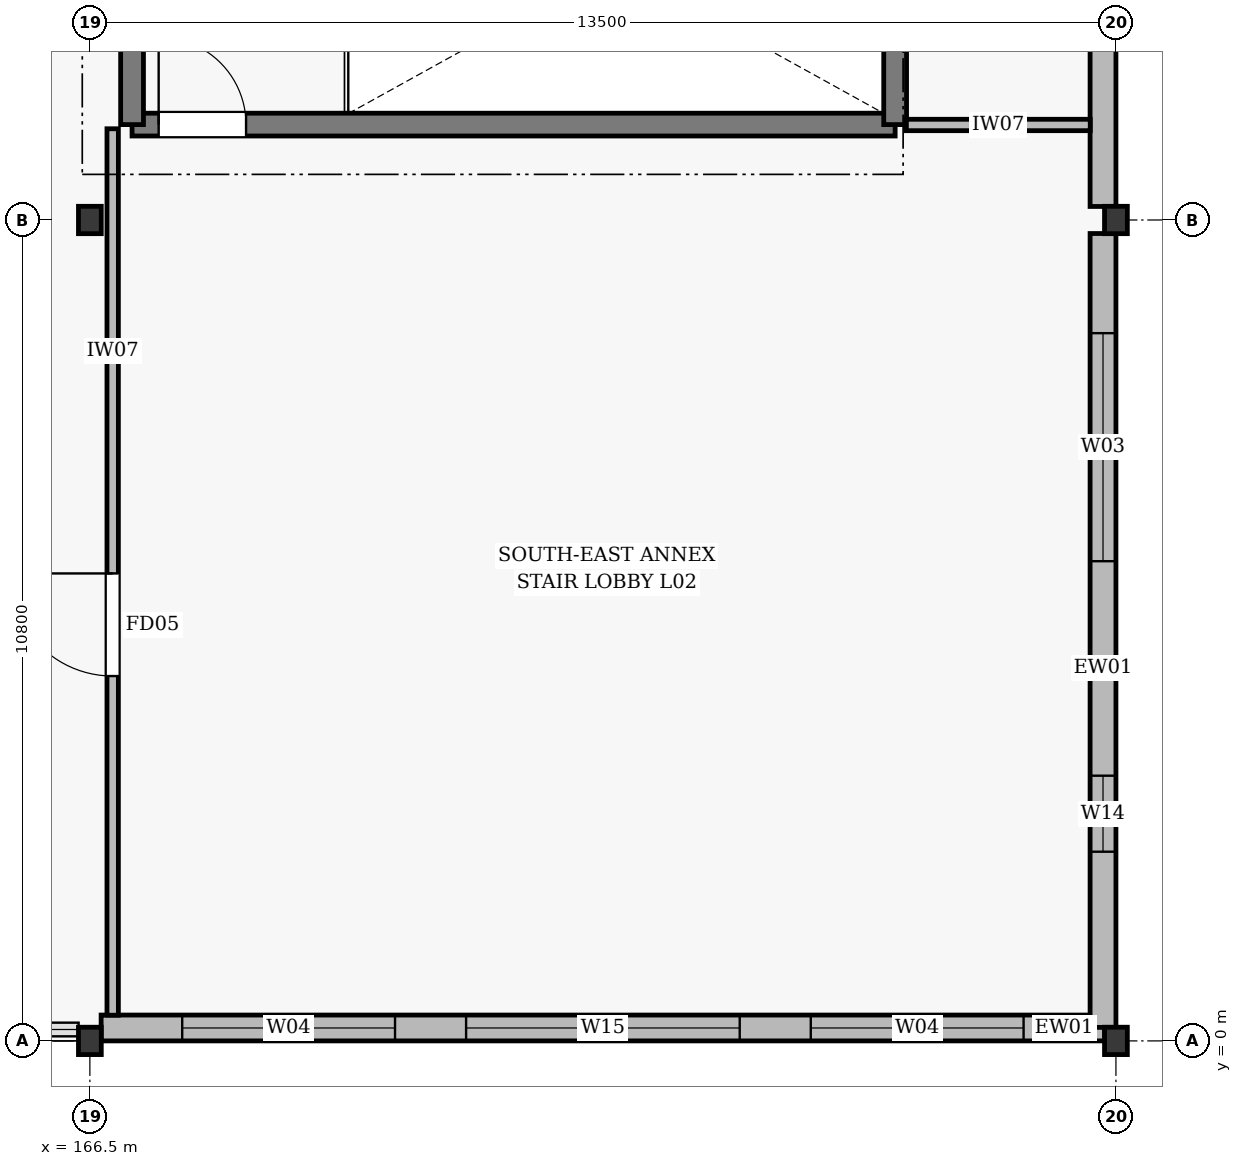
"""IFC4 building model, lengths in metres.
Left out: names, types, materials, properties, quantities, classifications, styles, units other than length and angle.
Written with IfcOpenShell. Run it as: python <this file> out.ifc"""

import sys

from ifc_helpers import new_model, si_unit, direction, frame, frame_2d, origin, origin_2d, place, context, subcontext, project, spatial, rectangle, i_section, extrude, element, fill, save


model = new_model("IFC4")
c1 = context("Model", 3, precision=1e-05, world=origin(), true_north=direction((0.0, 1.0)))
c2 = subcontext(c1, "Body", "Model", "MODEL_VIEW")
j1 = project(units=[si_unit("LENGTHUNIT", "METRE"), si_unit("PLANEANGLEUNIT", "RADIAN")], contexts=[c1])
p1 = place(None, origin())
s1 = spatial("IfcSite", under=j1, at=p1, CompositionType="ELEMENT")
p2 = place(p1, origin())
s2 = spatial("IfcBuilding", under=s1, at=p2, CompositionType="ELEMENT")
p3 = place(p2, frame((0.0, 0.0, 12.6)))
s3 = spatial("IfcBuildingStorey", under=s2, at=p3, CompositionType="ELEMENT", Elevation=12.6)
for number, where, z_axis, x_axis in (
    (1, (166.5, 0.0, 0.0), (0.0, 0.0, 1.0), (1.0, 0.0, 0.0)),
    (2, (166.5, 10.8, 0.0), (0.0, 0.0, 1.0), (1.0, 0.0, 0.0)),
    (3, (180.0, 0.0, 0.0), (0.0, 0.0, 1.0), (1.0, 0.0, 0.0)),
    (4, (180.0, 10.8, 0.0), (0.0, 0.0, 1.0), (1.0, 0.0, 0.0)),
):
    element("IfcColumn", number, at=place(p3, frame(where, z_axis=z_axis, x_axis=x_axis)), inside=s3, PredefinedType="COLUMN", context=c2, shape_type="SweptSolid", body=[
        extrude(i_section(OverallWidth=0.3, OverallDepth=0.36, WebThickness=0.012, FlangeThickness=0.022, at=origin_2d()), origin(), (0.0, 0.0, 1.0), 4.8),
    ])
p4 = place(p3, frame((166.648, 0.17, 0.0), z_axis=(0.0, 0.0, 1.0), x_axis=(1.0, 0.0, 0.0)))
e5 = element("IfcWall", 5, at=p4, inside=s3, PredefinedType="STANDARD", context=c2, shape_type="SweptSolid", body=[
    extrude(rectangle(XDim=13.204, YDim=0.34, at=frame_2d((6.602, 0.0))), origin(), (0.0, 0.0, 1.0), 3.9),
])
p5 = place(p4, frame((1.067, 0.0, 0.75)))
e6 = element("IfcOpeningElement", 6, at=p5, cuts=e5, PredefinedType="OPENING", context=c2, shape_type="SweptSolid", body=[
    extrude(rectangle(XDim=2.8, YDim=2.6, at=frame_2d((1.4, 1.3))), frame((0.0, 0.182, 0.0), z_axis=(0.0, -1.0, 0.0), x_axis=(1.0, 0.0, 0.0)), (0.0, 0.0, 1.0), 0.364),
])
p6 = place(p4, frame((4.802, 0.0, 1.05)))
e7 = element("IfcOpeningElement", 7, at=p6, cuts=e5, PredefinedType="OPENING", context=c2, shape_type="SweptSolid", body=[
    extrude(rectangle(XDim=3.6, YDim=1.4, at=frame_2d((1.8, 0.7))), frame((0.0, 0.182, 0.0), z_axis=(0.0, -1.0, 0.0), x_axis=(1.0, 0.0, 0.0)), (0.0, 0.0, 1.0), 0.364),
])
p7 = place(p4, frame((9.337, 0.0, 0.75)))
e8 = element("IfcOpeningElement", 8, at=p7, cuts=e5, PredefinedType="OPENING", context=c2, shape_type="SweptSolid", body=[
    extrude(rectangle(XDim=2.8, YDim=2.6, at=frame_2d((1.4, 1.3))), frame((0.0, 0.182, 0.0), z_axis=(0.0, -1.0, 0.0), x_axis=(1.0, 0.0, 0.0)), (0.0, 0.0, 1.0), 0.364),
])
p8 = place(p3, frame((179.83, 10.622, 0.0), z_axis=(0.0, 0.0, 1.0), x_axis=(0.0, -1.0, 0.0)))
e9 = element("IfcWall", 9, at=p8, inside=s3, PredefinedType="STANDARD", context=c2, shape_type="SweptSolid", body=[
    extrude(rectangle(XDim=10.444, YDim=0.34, at=frame_2d((5.222, 0.0))), origin(), (0.0, 0.0, 1.0), 3.9),
])
p9 = place(p8, frame((1.311, 0.0, 0.75)))
e10 = element("IfcOpeningElement", 10, at=p9, cuts=e9, PredefinedType="OPENING", context=c2, shape_type="SweptSolid", body=[
    extrude(rectangle(XDim=3.0, YDim=2.6, at=frame_2d((1.5, 1.3))), frame((0.0, 0.182, 0.0), z_axis=(0.0, -1.0, 0.0), x_axis=(1.0, 0.0, 0.0)), (0.0, 0.0, 1.0), 0.364),
])
p10 = place(p8, frame((7.133, 0.0, 1.05)))
e11 = element("IfcOpeningElement", 11, at=p10, cuts=e9, PredefinedType="OPENING", context=c2, shape_type="SweptSolid", body=[
    extrude(rectangle(XDim=1.0, YDim=1.6, at=frame_2d((0.5, 0.8))), frame((0.0, 0.182, 0.0), z_axis=(0.0, -1.0, 0.0), x_axis=(1.0, 0.0, 0.0)), (0.0, 0.0, 1.0), 0.364),
])
p11 = place(p3, frame((179.83, 21.422, 0.0), z_axis=(0.0, 0.0, 1.0), x_axis=(0.0, -1.0, 0.0)))
e12 = element("IfcWall", 12, at=p11, inside=s3, PredefinedType="STANDARD", context=c2, shape_type="SweptSolid", body=[
    extrude(rectangle(XDim=10.444, YDim=0.34, at=frame_2d((5.222, 0.0))), origin(), (0.0, 0.0, 1.0), 3.9),
])
p12 = place(p11, frame((1.311, 0.0, 0.75)))
e13 = element("IfcOpeningElement", 13, at=p12, cuts=e12, PredefinedType="OPENING", context=c2, shape_type="SweptSolid", body=[
    extrude(rectangle(XDim=3.0, YDim=2.6, at=frame_2d((1.5, 1.3))), frame((0.0, 0.182, 0.0), z_axis=(0.0, -1.0, 0.0), x_axis=(1.0, 0.0, 0.0)), (0.0, 0.0, 1.0), 0.364),
])
p13 = place(p11, frame((7.133, 0.0, 1.05)))
e14 = element("IfcOpeningElement", 14, at=p13, cuts=e12, PredefinedType="OPENING", context=c2, shape_type="SweptSolid", body=[
    extrude(rectangle(XDim=1.0, YDim=1.6, at=frame_2d((0.5, 0.8))), frame((0.0, 0.182, 0.0), z_axis=(0.0, -1.0, 0.0), x_axis=(1.0, 0.0, 0.0)), (0.0, 0.0, 1.0), 0.364),
])
p14 = place(p3, frame((167.055, 12.055, 0.0), z_axis=(0.0, 0.0, 1.0), x_axis=(1.0, 0.0, 0.0)))
e15 = element("IfcWall", 15, at=p14, inside=s3, PredefinedType="SOLIDWALL", context=c2, shape_type="SweptSolid", body=[
    extrude(rectangle(XDim=10.04, YDim=0.3, at=frame_2d((5.02, 0.0))), origin(), (0.0, 0.0, 1.0), 4.5),
])
p15 = place(p14, frame((0.35, 0.0, 0.005)))
e16 = element("IfcOpeningElement", 16, at=p15, cuts=e15, PredefinedType="OPENING", context=c2, shape_type="SweptSolid", body=[
    extrude(rectangle(XDim=1.15, YDim=2.15, at=frame_2d((0.575, 1.075))), frame((0.0, 0.162, 0.0), z_axis=(0.0, -1.0, 0.0), x_axis=(1.0, 0.0, 0.0)), (0.0, 0.0, 1.0), 0.324),
])
for number, where, z_axis, x_axis in (
    (17, (167.055, 12.055, 0.0), (0.0, 0.0, 1.0), (0.0, 1.0, 0.0)),
    (18, (177.095, 12.055, 0.0), (0.0, 0.0, 1.0), (0.0, 1.0, 0.0)),
):
    element("IfcWall", number, at=place(p3, frame(where, z_axis=z_axis, x_axis=x_axis)), inside=s3, PredefinedType="SOLIDWALL", context=c2, shape_type="SweptSolid", body=[
        extrude(rectangle(XDim=4.19, YDim=0.3, at=frame_2d((2.095, 0.0))), origin(), (0.0, 0.0, 1.0), 4.5),
    ])
p16 = place(p3, frame((166.8, 0.338, 0.0), z_axis=(0.0, 0.0, 1.0), x_axis=(0.0, 1.0, 0.0)))
e19 = element("IfcWall", 19, at=p16, inside=s3, PredefinedType="PARTITIONING", context=c2, shape_type="SweptSolid", body=[
    extrude(rectangle(XDim=11.662, YDim=0.15, at=frame_2d((5.831, 0.0))), origin(), (0.0, 0.0, 1.0), 4.08),
])
p17 = place(p16, frame((4.462, 0.0, 0.005)))
e20 = element("IfcOpeningElement", 20, at=p17, cuts=e19, PredefinedType="OPENING", context=c2, shape_type="SweptSolid", body=[
    extrude(rectangle(XDim=1.35, YDim=2.15, at=frame_2d((0.675, 1.075))), frame((0.0, 0.087, 0.0), z_axis=(0.0, -1.0, 0.0), x_axis=(1.0, 0.0, 0.0)), (0.0, 0.0, 1.0), 0.174),
])
p18 = place(p3, frame((177.243, 12.05, 0.0), z_axis=(0.0, 0.0, 1.0), x_axis=(1.0, 0.0, 0.0)))
e21 = element("IfcWall", 21, at=p18, inside=s3, PredefinedType="PARTITIONING", context=c2, shape_type="SweptSolid", body=[
    extrude(rectangle(XDim=2.419, YDim=0.15, at=frame_2d((1.209, 0.0))), origin(), (0.0, 0.0, 1.0), 4.27),
])
p19 = place(p5, origin())
e22 = element("IfcWindow", 22, at=p19, inside=s3, PartitioningType="DOUBLE_PANEL_VERTICAL", PredefinedType="WINDOW", context=c2, shape_type="SweptSolid", body=[
    extrude(rectangle(XDim=2.8, YDim=2.6, at=frame_2d((1.4, 1.3))), frame((0.0, 0.03, 0.0), z_axis=(0.0, -1.0, 0.0), x_axis=(1.0, 0.0, 0.0)), (0.0, 0.0, 1.0), 0.06),
])
fill(e6, e22)
p20 = place(p6, origin())
e23 = element("IfcWindow", 23, at=p20, inside=s3, PartitioningType="DOUBLE_PANEL_VERTICAL", PredefinedType="WINDOW", context=c2, shape_type="SweptSolid", body=[
    extrude(rectangle(XDim=3.6, YDim=1.4, at=frame_2d((1.8, 0.7))), frame((0.0, 0.03, 0.0), z_axis=(0.0, -1.0, 0.0), x_axis=(1.0, 0.0, 0.0)), (0.0, 0.0, 1.0), 0.06),
])
fill(e7, e23)
p21 = place(p7, origin())
e24 = element("IfcWindow", 24, at=p21, inside=s3, PartitioningType="DOUBLE_PANEL_VERTICAL", PredefinedType="WINDOW", context=c2, shape_type="SweptSolid", body=[
    extrude(rectangle(XDim=2.8, YDim=2.6, at=frame_2d((1.4, 1.3))), frame((0.0, 0.03, 0.0), z_axis=(0.0, -1.0, 0.0), x_axis=(1.0, 0.0, 0.0)), (0.0, 0.0, 1.0), 0.06),
])
fill(e8, e24)
p22 = place(p9, origin())
e25 = element("IfcWindow", 25, at=p22, inside=s3, PartitioningType="DOUBLE_PANEL_VERTICAL", PredefinedType="WINDOW", context=c2, shape_type="SweptSolid", body=[
    extrude(rectangle(XDim=3.0, YDim=2.6, at=frame_2d((1.5, 1.3))), frame((0.0, 0.03, 0.0), z_axis=(0.0, -1.0, 0.0), x_axis=(1.0, 0.0, 0.0)), (0.0, 0.0, 1.0), 0.06),
])
fill(e10, e25)
p23 = place(p10, origin())
e26 = element("IfcWindow", 26, at=p23, inside=s3, PartitioningType="DOUBLE_PANEL_VERTICAL", PredefinedType="WINDOW", context=c2, shape_type="SweptSolid", body=[
    extrude(rectangle(XDim=1.0, YDim=1.6, at=frame_2d((0.5, 0.8))), frame((0.0, 0.03, 0.0), z_axis=(0.0, -1.0, 0.0), x_axis=(1.0, 0.0, 0.0)), (0.0, 0.0, 1.0), 0.06),
])
fill(e11, e26)
p24 = place(p15, origin())
e27 = element("IfcDoor", 27, at=p24, inside=s3, OperationType="SINGLE_SWING_LEFT", PredefinedType="DOOR", context=c2, shape_type="SweptSolid", body=[
    extrude(rectangle(XDim=1.15, YDim=2.15, at=frame_2d((0.575, 1.075))), frame((0.0, 0.025, 0.0), z_axis=(0.0, -1.0, 0.0), x_axis=(1.0, 0.0, 0.0)), (0.0, 0.0, 1.0), 0.05),
])
fill(e16, e27)
p25 = place(p17, origin())
e28 = element("IfcDoor", 28, at=p25, inside=s3, OperationType="SINGLE_SWING_RIGHT", PredefinedType="DOOR", context=c2, shape_type="SweptSolid", body=[
    extrude(rectangle(XDim=1.35, YDim=2.15, at=frame_2d((0.675, 1.075))), frame((0.0, 0.025, 0.0), z_axis=(0.0, -1.0, 0.0), x_axis=(1.0, 0.0, 0.0)), (0.0, 0.0, 1.0), 0.05),
])
fill(e20, e28)
save(model, sys.argv[1])
